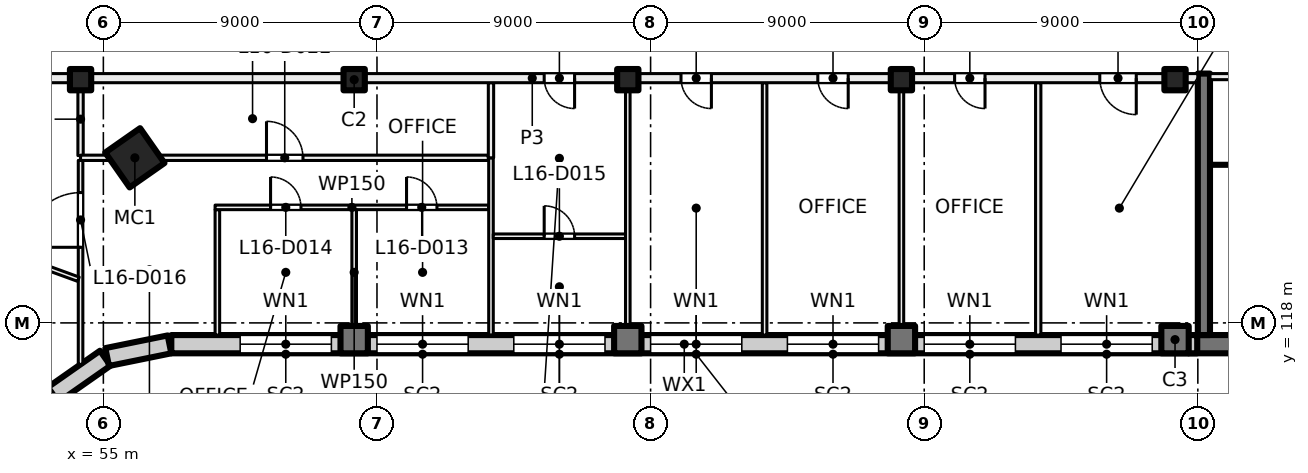
"""IFC4 building model, lengths in metres.
Left out: names, types, materials, properties, quantities, classifications, styles, units other than length and angle.
Written with IfcOpenShell. Run it as: python <this file> out.ifc"""

import sys

from ifc_helpers import new_model, si_unit, direction, frame, frame_2d, origin, origin_2d, place, context, subcontext, project, spatial, rectangle, hollow_rectangle, extrude, element, fill, save


model = new_model("IFC4")
c1 = context("Model", 3, precision=1e-05, world=origin(), true_north=direction((0.0, 1.0)))
c2 = subcontext(c1, "Body", "Model", "MODEL_VIEW")
j1 = project(units=[si_unit("LENGTHUNIT", "METRE"), si_unit("PLANEANGLEUNIT", "RADIAN")], contexts=[c1])
p1 = place(None, origin())
s1 = spatial("IfcSite", under=j1, at=p1, CompositionType="ELEMENT")
p2 = place(p1, origin())
s2 = spatial("IfcBuilding", under=s1, at=p2, CompositionType="ELEMENT")
p3 = place(p2, frame((0.0, 0.0, 71.5)))
s3 = spatial("IfcBuildingStorey", under=s2, at=p3, CompositionType="ELEMENT", Elevation=71.5)
p4 = place(p3, frame((56.036, 123.43, 0.0), z_axis=(0.0, 0.0, 1.0), x_axis=(0.573576436351, -0.819152044289, 0.0)))
e1 = element("IfcColumn", 1, at=p4, inside=s3, PredefinedType="COLUMN", context=c2, shape_type="SweptSolid", body=[
    extrude(hollow_rectangle(XDim=1.4, YDim=1.4, WallThickness=0.04, at=origin_2d()), origin(), (0.0, 0.0, 1.0), 4.0),
])
for number, where, z_axis, x_axis in (
    (2, (54.25, 126.0, 0.0), (0.0, 0.0, 1.0), (1.0, 0.0, 0.0)),
    (3, (63.25, 126.0, 0.0), (0.0, 0.0, 1.0), (1.0, 0.0, 0.0)),
    (4, (72.25, 126.0, 0.0), (0.0, 0.0, 1.0), (1.0, 0.0, 0.0)),
    (5, (81.25, 126.0, 0.0), (0.0, 0.0, 1.0), (1.0, 0.0, 0.0)),
    (6, (90.25, 126.0, 0.0), (0.0, 0.0, 1.0), (1.0, 0.0, 0.0)),
):
    element("IfcColumn", number, at=place(p3, frame(where, z_axis=z_axis, x_axis=x_axis)), inside=s3, PredefinedType="COLUMN", context=c2, shape_type="SweptSolid", body=[
        extrude(rectangle(XDim=0.7, YDim=0.7, at=origin_2d()), origin(), (0.0, 0.0, 1.0), 4.0),
    ])
for number, where, z_axis, x_axis in (
    (7, (63.25, 117.45, 0.0), (0.0, 0.0, 1.0), (1.0, 0.0, 0.0)),
    (8, (72.25, 117.45, 0.0), (0.0, 0.0, 1.0), (1.0, 0.0, 0.0)),
    (9, (81.25, 117.45, 0.0), (0.0, 0.0, 1.0), (1.0, 0.0, 0.0)),
    (10, (90.25, 117.45, 0.0), (0.0, 0.0, 1.0), (1.0, 0.0, 0.0)),
):
    element("IfcColumn", number, at=place(p3, frame(where, z_axis=z_axis, x_axis=x_axis)), inside=s3, PredefinedType="COLUMN", context=c2, shape_type="SweptSolid", body=[
        extrude(rectangle(XDim=0.9, YDim=0.9, at=origin_2d()), origin(), (0.0, 0.0, 1.0), 4.0),
    ])
p5 = place(p3, frame((99.6, 117.3, 0.0), z_axis=(0.0, 0.0, 1.0), x_axis=(-1.0, 0.0, 0.0)))
e11 = element("IfcWall", 11, at=p5, inside=s3, PredefinedType="SHEAR", context=c2, shape_type="SweptSolid", body=[
    extrude(rectangle(XDim=8.9, YDim=0.6, at=frame_2d((4.45, 0.0))), origin(), (0.0, 0.0, 1.0), 4.0),
])
p6 = place(p3, frame((91.2, 126.2, 0.0), z_axis=(0.0, 0.0, 1.0), x_axis=(0.0, -1.0, 0.0)))
e12 = element("IfcWall", 12, at=p6, inside=s3, PredefinedType="SHEAR", context=c2, shape_type="SweptSolid", body=[
    extrude(rectangle(XDim=8.6, YDim=0.4, at=frame_2d((4.3, 0.0))), origin(), (0.0, 0.0, 1.0), 4.0),
])
p7 = place(p3, frame((53.305, 115.578, 0.0), z_axis=(0.0, 0.0, 1.0), x_axis=(-0.522402266438, -0.852699168535, 0.0)))
e13 = element("IfcWall", 13, at=p7, inside=s3, PredefinedType="SOLIDWALL", context=c2, shape_type="SweptSolid", body=[
    extrude(rectangle(XDim=2.042, YDim=0.6, at=frame_2d((1.021, 0.0))), origin(), (0.0, 0.0, 1.0), 3.625),
])
for number, where, z_axis, x_axis in (
    (14, (55.062, 116.839, 0.0), (0.0, 0.0, 1.0), (-0.819, -0.574, 0.0)),
    (15, (57.175, 117.294, 0.0), (0.0, 0.0, 1.0), (-0.98, -0.199, 0.0)),
):
    element("IfcWall", number, at=place(p3, frame(where, z_axis=z_axis, x_axis=x_axis)), inside=s3, PredefinedType="SOLIDWALL", context=c2, shape_type="SweptSolid", body=[
        extrude(rectangle(XDim=2.092, YDim=0.6, at=frame_2d((1.046, 0.0))), origin(), (0.0, 0.0, 1.0), 3.625),
    ])
p8 = place(p3, frame((90.98, 117.3, 0.0), z_axis=(0.0, 0.0, 1.0), x_axis=(-1.0, 0.0, 0.0)))
e16 = element("IfcWall", 16, at=p8, inside=s3, PredefinedType="SOLIDWALL", context=c2, shape_type="SweptSolid", body=[
    extrude(rectangle(XDim=33.745, YDim=0.6, at=frame_2d((16.873, 0.0))), origin(), (0.0, 0.0, 1.0), 3.625),
])
p9 = place(p8, frame((1.48, 0.0, 0.9)))
e17 = element("IfcOpeningElement", 17, at=p9, cuts=e16, PredefinedType="OPENING", context=c2, shape_type="SweptSolid", body=[
    extrude(rectangle(XDim=3.0, YDim=2.4, at=frame_2d((1.5, 1.2))), frame((0.0, 0.31, 0.0), z_axis=(0.0, -1.0, 0.0), x_axis=(1.0, 0.0, 0.0)), (0.0, 0.0, 1.0), 0.62),
])
p10 = place(p8, frame((5.98, 0.0, 0.9)))
e18 = element("IfcOpeningElement", 18, at=p10, cuts=e16, PredefinedType="OPENING", context=c2, shape_type="SweptSolid", body=[
    extrude(rectangle(XDim=3.0, YDim=2.4, at=frame_2d((1.5, 1.2))), frame((0.0, 0.31, 0.0), z_axis=(0.0, -1.0, 0.0), x_axis=(1.0, 0.0, 0.0)), (0.0, 0.0, 1.0), 0.62),
])
p11 = place(p8, frame((10.48, 0.0, 0.9)))
e19 = element("IfcOpeningElement", 19, at=p11, cuts=e16, PredefinedType="OPENING", context=c2, shape_type="SweptSolid", body=[
    extrude(rectangle(XDim=3.0, YDim=2.4, at=frame_2d((1.5, 1.2))), frame((0.0, 0.31, 0.0), z_axis=(0.0, -1.0, 0.0), x_axis=(1.0, 0.0, 0.0)), (0.0, 0.0, 1.0), 0.62),
])
p12 = place(p8, frame((14.98, 0.0, 0.9)))
e20 = element("IfcOpeningElement", 20, at=p12, cuts=e16, PredefinedType="OPENING", context=c2, shape_type="SweptSolid", body=[
    extrude(rectangle(XDim=3.0, YDim=2.4, at=frame_2d((1.5, 1.2))), frame((0.0, 0.31, 0.0), z_axis=(0.0, -1.0, 0.0), x_axis=(1.0, 0.0, 0.0)), (0.0, 0.0, 1.0), 0.62),
])
p13 = place(p8, frame((19.48, 0.0, 0.9)))
e21 = element("IfcOpeningElement", 21, at=p13, cuts=e16, PredefinedType="OPENING", context=c2, shape_type="SweptSolid", body=[
    extrude(rectangle(XDim=3.0, YDim=2.4, at=frame_2d((1.5, 1.2))), frame((0.0, 0.31, 0.0), z_axis=(0.0, -1.0, 0.0), x_axis=(1.0, 0.0, 0.0)), (0.0, 0.0, 1.0), 0.62),
])
p14 = place(p8, frame((23.98, 0.0, 0.9)))
e22 = element("IfcOpeningElement", 22, at=p14, cuts=e16, PredefinedType="OPENING", context=c2, shape_type="SweptSolid", body=[
    extrude(rectangle(XDim=3.0, YDim=2.4, at=frame_2d((1.5, 1.2))), frame((0.0, 0.31, 0.0), z_axis=(0.0, -1.0, 0.0), x_axis=(1.0, 0.0, 0.0)), (0.0, 0.0, 1.0), 0.62),
])
p15 = place(p8, frame((28.48, 0.0, 0.9)))
e23 = element("IfcOpeningElement", 23, at=p15, cuts=e16, PredefinedType="OPENING", context=c2, shape_type="SweptSolid", body=[
    extrude(rectangle(XDim=3.0, YDim=2.4, at=frame_2d((1.5, 1.2))), frame((0.0, 0.31, 0.0), z_axis=(0.0, -1.0, 0.0), x_axis=(1.0, 0.0, 0.0)), (0.0, 0.0, 1.0), 0.62),
])
p16 = place(p3, frame((95.2, 126.1, 0.0), z_axis=(0.0, 0.0, 1.0), x_axis=(-1.0, 0.0, 0.0)))
e24 = element("IfcWall", 24, at=p16, inside=s3, PredefinedType="PARTITIONING", context=c2, shape_type="SweptSolid", body=[
    extrude(rectangle(XDim=3.8, YDim=0.2, at=frame_2d((1.9, 0.0))), origin(), (0.0, 0.0, 1.0), 3.625),
])
p17 = place(p16, frame((0.3, 0.0, 0.0)))
e25 = element("IfcOpeningElement", 25, at=p17, cuts=e24, PredefinedType="OPENING", context=c2, shape_type="SweptSolid", body=[
    extrude(rectangle(XDim=1.2, YDim=2.1, at=frame_2d((0.6, 1.05))), frame((0.0, 0.11, 0.0), z_axis=(0.0, -1.0, 0.0), x_axis=(1.0, 0.0, 0.0)), (0.0, 0.0, 1.0), 0.22),
])
p18 = place(p3, frame((93.35, 123.2, 0.0), z_axis=(0.0, 0.0, 1.0), x_axis=(-1.0, 0.0, 0.0)))
e26 = element("IfcWall", 26, at=p18, inside=s3, PredefinedType="PARTITIONING", context=c2, shape_type="SweptSolid", body=[
    extrude(rectangle(XDim=1.95, YDim=0.1, at=frame_2d((0.975, 0.0))), origin(), (0.0, 0.0, 1.0), 3.625),
])
p19 = place(p3, frame((54.25, 116.637, 0.0), z_axis=(0.0, 0.0, 1.0), x_axis=(0.0, 1.0, 0.0)))
e27 = element("IfcWall", 27, at=p19, inside=s3, PredefinedType="PARTITIONING", context=c2, shape_type="SweptSolid", body=[
    extrude(rectangle(XDim=6.709, YDim=0.15, at=frame_2d((3.354, 0.0))), origin(), (0.0, 0.0, 1.0), 3.625),
])
p20 = place(p19, frame((3.85, 0.0, 0.0)))
e28 = element("IfcOpeningElement", 28, at=p20, cuts=e27, PredefinedType="OPENING", context=c2, shape_type="SweptSolid", body=[
    extrude(rectangle(XDim=1.8, YDim=2.1, at=frame_2d((0.9, 1.05))), frame((0.0, 0.085, 0.0), z_axis=(0.0, -1.0, 0.0), x_axis=(1.0, 0.0, 0.0)), (0.0, 0.0, 1.0), 0.17),
])
p21 = place(p3, frame((54.18, 119.436, 0.0), z_axis=(0.0, 0.0, 1.0), x_axis=(-0.939669476286, 0.342083725624, 0.0)))
e29 = element("IfcWall", 29, at=p21, inside=s3, PredefinedType="PARTITIONING", context=c2, shape_type="SweptSolid", body=[
    extrude(rectangle(XDim=8.516, YDim=0.15, at=frame_2d((4.258, 0.0))), origin(), (0.0, 0.0, 1.0), 3.625),
])
p22 = place(p3, frame((54.25, 123.502, 0.0), z_axis=(0.0, 0.0, 1.0), x_axis=(0.0, 1.0, 0.0)))
e30 = element("IfcWall", 30, at=p22, inside=s3, PredefinedType="PARTITIONING", context=c2, shape_type="SweptSolid", body=[
    extrude(rectangle(XDim=2.398, YDim=0.175, at=frame_2d((1.199, 0.0))), origin(), (0.0, 0.0, 1.0), 3.625),
])
p23 = place(p3, frame((54.25, 123.43, 0.0), z_axis=(0.0, 0.0, 1.0), x_axis=(1.0, 0.0, 0.0)))
e31 = element("IfcWall", 31, at=p23, inside=s3, PredefinedType="PARTITIONING", context=c2, shape_type="SweptSolid", body=[
    extrude(rectangle(XDim=13.412, YDim=0.175, at=frame_2d((6.706, 0.0))), origin(), (0.0, 0.0, 1.0), 3.625),
])
p24 = place(p23, frame((6.116, 0.0, 0.0)))
e32 = element("IfcOpeningElement", 32, at=p24, cuts=e31, PredefinedType="OPENING", context=c2, shape_type="SweptSolid", body=[
    extrude(rectangle(XDim=1.2, YDim=2.1, at=frame_2d((0.6, 1.05))), frame((0.0, 0.097, 0.0), z_axis=(0.0, -1.0, 0.0), x_axis=(1.0, 0.0, 0.0)), (0.0, 0.0, 1.0), 0.195),
])
p25 = place(p3, frame((58.75, 117.6, 0.0), z_axis=(0.0, 0.0, 1.0), x_axis=(0.0, 1.0, 0.0)))
e33 = element("IfcWall", 33, at=p25, inside=s3, PredefinedType="PARTITIONING", context=c2, shape_type="SweptSolid", body=[
    extrude(rectangle(XDim=4.125, YDim=0.15, at=frame_2d((2.062, 0.0))), origin(), (0.0, 0.0, 1.0), 3.625),
])
p26 = place(p3, frame((58.675, 121.8, 0.0), z_axis=(0.0, 0.0, 1.0), x_axis=(1.0, 0.0, 0.0)))
e34 = element("IfcWall", 34, at=p26, inside=s3, PredefinedType="PARTITIONING", context=c2, shape_type="SweptSolid", body=[
    extrude(rectangle(XDim=9.0, YDim=0.15, at=frame_2d((4.5, 0.0))), origin(), (0.0, 0.0, 1.0), 3.625),
])
p27 = place(p26, frame((6.298, 0.0, 0.0)))
e35 = element("IfcOpeningElement", 35, at=p27, cuts=e34, PredefinedType="OPENING", context=c2, shape_type="SweptSolid", body=[
    extrude(rectangle(XDim=1.0, YDim=2.1, at=frame_2d((0.5, 1.05))), frame((0.0, 0.085, 0.0), z_axis=(0.0, -1.0, 0.0), x_axis=(1.0, 0.0, 0.0)), (0.0, 0.0, 1.0), 0.17),
])
p28 = place(p26, frame((1.825, 0.0, 0.0)))
e36 = element("IfcOpeningElement", 36, at=p28, cuts=e34, PredefinedType="OPENING", context=c2, shape_type="SweptSolid", body=[
    extrude(rectangle(XDim=1.0, YDim=2.1, at=frame_2d((0.5, 1.05))), frame((0.0, 0.085, 0.0), z_axis=(0.0, -1.0, 0.0), x_axis=(1.0, 0.0, 0.0)), (0.0, 0.0, 1.0), 0.17),
])
p29 = place(p3, frame((63.25, 117.6, 0.0), z_axis=(0.0, 0.0, 1.0), x_axis=(0.0, 1.0, 0.0)))
e37 = element("IfcWall", 37, at=p29, inside=s3, PredefinedType="PARTITIONING", context=c2, shape_type="SweptSolid", body=[
    extrude(rectangle(XDim=4.125, YDim=0.15, at=frame_2d((2.062, 0.0))), origin(), (0.0, 0.0, 1.0), 3.625),
])
p30 = place(p3, frame((67.75, 117.6, 0.0), z_axis=(0.0, 0.0, 1.0), x_axis=(0.0, 1.0, 0.0)))
e38 = element("IfcWall", 38, at=p30, inside=s3, PredefinedType="PARTITIONING", context=c2, shape_type="SweptSolid", body=[
    extrude(rectangle(XDim=5.83, YDim=0.15, at=frame_2d((2.915, 0.0))), origin(), (0.0, 0.0, 1.0), 3.625),
])
p31 = place(p3, frame((67.825, 120.85, 0.0), z_axis=(0.0, 0.0, 1.0), x_axis=(1.0, 0.0, 0.0)))
e39 = element("IfcWall", 39, at=p31, inside=s3, PredefinedType="PARTITIONING", context=c2, shape_type="SweptSolid", body=[
    extrude(rectangle(XDim=4.35, YDim=0.15, at=frame_2d((2.175, 0.0))), origin(), (0.0, 0.0, 1.0), 3.625),
])
p32 = place(p31, frame((1.675, 0.0, 0.0)))
e40 = element("IfcOpeningElement", 40, at=p32, cuts=e39, PredefinedType="OPENING", context=c2, shape_type="SweptSolid", body=[
    extrude(rectangle(XDim=1.0, YDim=2.1, at=frame_2d((0.5, 1.05))), frame((0.0, 0.085, 0.0), z_axis=(0.0, -1.0, 0.0), x_axis=(1.0, 0.0, 0.0)), (0.0, 0.0, 1.0), 0.17),
])
p33 = place(p3, frame((67.75, 123.43, 0.0), z_axis=(0.0, 0.0, 1.0), x_axis=(0.0, 1.0, 0.0)))
e41 = element("IfcWall", 41, at=p33, inside=s3, PredefinedType="PARTITIONING", context=c2, shape_type="SweptSolid", body=[
    extrude(rectangle(XDim=2.47, YDim=0.175, at=frame_2d((1.235, 0.0))), origin(), (0.0, 0.0, 1.0), 3.625),
])
for number, where, z_axis, x_axis in (
    (42, (72.25, 117.6, 0.0), (0.0, 0.0, 1.0), (0.0, 1.0, 0.0)),
    (43, (76.75, 117.6, 0.0), (0.0, 0.0, 1.0), (0.0, 1.0, 0.0)),
    (44, (81.25, 117.6, 0.0), (0.0, 0.0, 1.0), (0.0, 1.0, 0.0)),
):
    element("IfcWall", number, at=place(p3, frame(where, z_axis=z_axis, x_axis=x_axis)), inside=s3, PredefinedType="PARTITIONING", context=c2, shape_type="SweptSolid", body=[
        extrude(rectangle(XDim=8.3, YDim=0.15, at=frame_2d((4.15, 0.0))), origin(), (0.0, 0.0, 1.0), 3.625),
    ])
p34 = place(p3, frame((85.75, 117.6, 0.0), z_axis=(0.0, 0.0, 1.0), x_axis=(0.0, 1.0, 0.0)))
e45 = element("IfcWall", 45, at=p34, inside=s3, PredefinedType="PARTITIONING", context=c2, shape_type="SweptSolid", body=[
    extrude(rectangle(XDim=8.3, YDim=0.175, at=frame_2d((4.15, 0.0))), origin(), (0.0, 0.0, 1.0), 3.625),
])
p35 = place(p3, frame((91.0, 126.05, 0.0), z_axis=(0.0, 0.0, 1.0), x_axis=(-1.0, 0.0, 0.0)))
e46 = element("IfcWall", 46, at=p35, inside=s3, PredefinedType="PARTITIONING", context=c2, shape_type="SweptSolid", body=[
    extrude(rectangle(XDim=43.785, YDim=0.3, at=frame_2d((21.893, 0.0))), origin(), (0.0, 0.0, 1.0), 3.625),
])
p36 = place(p35, frame((2.025, 0.0, 0.0)))
e47 = element("IfcOpeningElement", 47, at=p36, cuts=e46, PredefinedType="OPENING", context=c2, shape_type="SweptSolid", body=[
    extrude(rectangle(XDim=1.2, YDim=2.1, at=frame_2d((0.6, 1.05))), frame((0.0, 0.16, 0.0), z_axis=(0.0, -1.0, 0.0), x_axis=(1.0, 0.0, 0.0)), (0.0, 0.0, 1.0), 0.32),
])
p37 = place(p35, frame((7.0, 0.0, 0.0)))
e48 = element("IfcOpeningElement", 48, at=p37, cuts=e46, PredefinedType="OPENING", context=c2, shape_type="SweptSolid", body=[
    extrude(rectangle(XDim=1.0, YDim=2.1, at=frame_2d((0.5, 1.05))), frame((0.0, 0.16, 0.0), z_axis=(0.0, -1.0, 0.0), x_axis=(1.0, 0.0, 0.0)), (0.0, 0.0, 1.0), 0.32),
])
p38 = place(p35, frame((11.5, 0.0, 0.0)))
e49 = element("IfcOpeningElement", 49, at=p38, cuts=e46, PredefinedType="OPENING", context=c2, shape_type="SweptSolid", body=[
    extrude(rectangle(XDim=1.0, YDim=2.1, at=frame_2d((0.5, 1.05))), frame((0.0, 0.16, 0.0), z_axis=(0.0, -1.0, 0.0), x_axis=(1.0, 0.0, 0.0)), (0.0, 0.0, 1.0), 0.32),
])
p39 = place(p35, frame((16.0, 0.0, 0.0)))
e50 = element("IfcOpeningElement", 50, at=p39, cuts=e46, PredefinedType="OPENING", context=c2, shape_type="SweptSolid", body=[
    extrude(rectangle(XDim=1.0, YDim=2.1, at=frame_2d((0.5, 1.05))), frame((0.0, 0.16, 0.0), z_axis=(0.0, -1.0, 0.0), x_axis=(1.0, 0.0, 0.0)), (0.0, 0.0, 1.0), 0.32),
])
p40 = place(p35, frame((20.5, 0.0, 0.0)))
e51 = element("IfcOpeningElement", 51, at=p40, cuts=e46, PredefinedType="OPENING", context=c2, shape_type="SweptSolid", body=[
    extrude(rectangle(XDim=1.0, YDim=2.1, at=frame_2d((0.5, 1.05))), frame((0.0, 0.16, 0.0), z_axis=(0.0, -1.0, 0.0), x_axis=(1.0, 0.0, 0.0)), (0.0, 0.0, 1.0), 0.32),
])
p41 = place(p35, frame((39.296, 0.0, 0.0)))
e52 = element("IfcOpeningElement", 52, at=p41, cuts=e46, PredefinedType="OPENING", context=c2, shape_type="SweptSolid", body=[
    extrude(rectangle(XDim=1.8, YDim=2.1, at=frame_2d((0.9, 1.05))), frame((0.0, 0.16, 0.0), z_axis=(0.0, -1.0, 0.0), x_axis=(1.0, 0.0, 0.0)), (0.0, 0.0, 1.0), 0.32),
])
p42 = place(p9, origin())
e53 = element("IfcWindow", 53, at=p42, inside=s3, PartitioningType="SINGLE_PANEL", PredefinedType="WINDOW", context=c2, shape_type="SweptSolid", body=[
    extrude(rectangle(XDim=3.0, YDim=2.4, at=frame_2d((1.5, 1.2))), frame((0.0, 0.03, 0.0), z_axis=(0.0, -1.0, 0.0), x_axis=(1.0, 0.0, 0.0)), (0.0, 0.0, 1.0), 0.06),
])
fill(e17, e53)
p43 = place(p10, origin())
e54 = element("IfcWindow", 54, at=p43, inside=s3, PartitioningType="SINGLE_PANEL", PredefinedType="WINDOW", context=c2, shape_type="SweptSolid", body=[
    extrude(rectangle(XDim=3.0, YDim=2.4, at=frame_2d((1.5, 1.2))), frame((0.0, 0.03, 0.0), z_axis=(0.0, -1.0, 0.0), x_axis=(1.0, 0.0, 0.0)), (0.0, 0.0, 1.0), 0.06),
])
fill(e18, e54)
p44 = place(p11, origin())
e55 = element("IfcWindow", 55, at=p44, inside=s3, PartitioningType="SINGLE_PANEL", PredefinedType="WINDOW", context=c2, shape_type="SweptSolid", body=[
    extrude(rectangle(XDim=3.0, YDim=2.4, at=frame_2d((1.5, 1.2))), frame((0.0, 0.03, 0.0), z_axis=(0.0, -1.0, 0.0), x_axis=(1.0, 0.0, 0.0)), (0.0, 0.0, 1.0), 0.06),
])
fill(e19, e55)
p45 = place(p12, origin())
e56 = element("IfcWindow", 56, at=p45, inside=s3, PartitioningType="SINGLE_PANEL", PredefinedType="WINDOW", context=c2, shape_type="SweptSolid", body=[
    extrude(rectangle(XDim=3.0, YDim=2.4, at=frame_2d((1.5, 1.2))), frame((0.0, 0.03, 0.0), z_axis=(0.0, -1.0, 0.0), x_axis=(1.0, 0.0, 0.0)), (0.0, 0.0, 1.0), 0.06),
])
fill(e20, e56)
p46 = place(p13, origin())
e57 = element("IfcWindow", 57, at=p46, inside=s3, PartitioningType="SINGLE_PANEL", PredefinedType="WINDOW", context=c2, shape_type="SweptSolid", body=[
    extrude(rectangle(XDim=3.0, YDim=2.4, at=frame_2d((1.5, 1.2))), frame((0.0, 0.03, 0.0), z_axis=(0.0, -1.0, 0.0), x_axis=(1.0, 0.0, 0.0)), (0.0, 0.0, 1.0), 0.06),
])
fill(e21, e57)
p47 = place(p14, origin())
e58 = element("IfcWindow", 58, at=p47, inside=s3, PartitioningType="SINGLE_PANEL", PredefinedType="WINDOW", context=c2, shape_type="SweptSolid", body=[
    extrude(rectangle(XDim=3.0, YDim=2.4, at=frame_2d((1.5, 1.2))), frame((0.0, 0.03, 0.0), z_axis=(0.0, -1.0, 0.0), x_axis=(1.0, 0.0, 0.0)), (0.0, 0.0, 1.0), 0.06),
])
fill(e22, e58)
p48 = place(p15, origin())
e59 = element("IfcWindow", 59, at=p48, inside=s3, PartitioningType="SINGLE_PANEL", PredefinedType="WINDOW", context=c2, shape_type="SweptSolid", body=[
    extrude(rectangle(XDim=3.0, YDim=2.4, at=frame_2d((1.5, 1.2))), frame((0.0, 0.03, 0.0), z_axis=(0.0, -1.0, 0.0), x_axis=(1.0, 0.0, 0.0)), (0.0, 0.0, 1.0), 0.06),
])
fill(e23, e59)
p49 = place(p36, origin())
e60 = element("IfcDoor", 60, at=p49, inside=s3, OperationType="DOUBLE_DOOR_SINGLE_SWING", PredefinedType="DOOR", context=c2, shape_type="SweptSolid", body=[
    extrude(rectangle(XDim=1.2, YDim=2.1, at=frame_2d((0.6, 1.05))), frame((0.0, 0.025, 0.0), z_axis=(0.0, -1.0, 0.0), x_axis=(1.0, 0.0, 0.0)), (0.0, 0.0, 1.0), 0.05),
])
fill(e47, e60)
p50 = place(p37, origin())
e61 = element("IfcDoor", 61, at=p50, inside=s3, OperationType="SINGLE_SWING_RIGHT", PredefinedType="DOOR", context=c2, shape_type="SweptSolid", body=[
    extrude(rectangle(XDim=1.0, YDim=2.1, at=frame_2d((0.5, 1.05))), frame((0.0, 0.025, 0.0), z_axis=(0.0, -1.0, 0.0), x_axis=(1.0, 0.0, 0.0)), (0.0, 0.0, 1.0), 0.05),
])
fill(e48, e61)
p51 = place(p38, origin())
e62 = element("IfcDoor", 62, at=p51, inside=s3, OperationType="SINGLE_SWING_LEFT", PredefinedType="DOOR", context=c2, shape_type="SweptSolid", body=[
    extrude(rectangle(XDim=1.0, YDim=2.1, at=frame_2d((0.5, 1.05))), frame((0.0, 0.025, 0.0), z_axis=(0.0, -1.0, 0.0), x_axis=(1.0, 0.0, 0.0)), (0.0, 0.0, 1.0), 0.05),
])
fill(e49, e62)
p52 = place(p39, origin())
e63 = element("IfcDoor", 63, at=p52, inside=s3, OperationType="SINGLE_SWING_LEFT", PredefinedType="DOOR", context=c2, shape_type="SweptSolid", body=[
    extrude(rectangle(XDim=1.0, YDim=2.1, at=frame_2d((0.5, 1.05))), frame((0.0, 0.025, 0.0), z_axis=(0.0, -1.0, 0.0), x_axis=(1.0, 0.0, 0.0)), (0.0, 0.0, 1.0), 0.05),
])
fill(e50, e63)
p53 = place(p40, origin())
e64 = element("IfcDoor", 64, at=p53, inside=s3, OperationType="SINGLE_SWING_LEFT", PredefinedType="DOOR", context=c2, shape_type="SweptSolid", body=[
    extrude(rectangle(XDim=1.0, YDim=2.1, at=frame_2d((0.5, 1.05))), frame((0.0, 0.025, 0.0), z_axis=(0.0, -1.0, 0.0), x_axis=(1.0, 0.0, 0.0)), (0.0, 0.0, 1.0), 0.05),
])
fill(e51, e64)
p54 = place(p27, origin())
e65 = element("IfcDoor", 65, at=p54, inside=s3, OperationType="SINGLE_SWING_RIGHT", PredefinedType="DOOR", context=c2, shape_type="SweptSolid", body=[
    extrude(rectangle(XDim=1.0, YDim=2.1, at=frame_2d((0.5, 1.05))), frame((0.0, 0.025, 0.0), z_axis=(0.0, -1.0, 0.0), x_axis=(1.0, 0.0, 0.0)), (0.0, 0.0, 1.0), 0.05),
])
fill(e35, e65)
p55 = place(p28, origin())
e66 = element("IfcDoor", 66, at=p55, inside=s3, OperationType="SINGLE_SWING_LEFT", PredefinedType="DOOR", context=c2, shape_type="SweptSolid", body=[
    extrude(rectangle(XDim=1.0, YDim=2.1, at=frame_2d((0.5, 1.05))), frame((0.0, 0.025, 0.0), z_axis=(0.0, -1.0, 0.0), x_axis=(1.0, 0.0, 0.0)), (0.0, 0.0, 1.0), 0.05),
])
fill(e36, e66)
p56 = place(p32, origin())
e67 = element("IfcDoor", 67, at=p56, inside=s3, OperationType="SINGLE_SWING_LEFT", PredefinedType="DOOR", context=c2, shape_type="SweptSolid", body=[
    extrude(rectangle(XDim=1.0, YDim=2.1, at=frame_2d((0.5, 1.05))), frame((0.0, 0.025, 0.0), z_axis=(0.0, -1.0, 0.0), x_axis=(1.0, 0.0, 0.0)), (0.0, 0.0, 1.0), 0.05),
])
fill(e40, e67)
p57 = place(p20, origin())
e68 = element("IfcDoor", 68, at=p57, inside=s3, OperationType="DOUBLE_DOOR_SINGLE_SWING", PredefinedType="DOOR", context=c2, shape_type="SweptSolid", body=[
    extrude(rectangle(XDim=1.8, YDim=2.1, at=frame_2d((0.9, 1.05))), frame((0.0, 0.025, 0.0), z_axis=(0.0, -1.0, 0.0), x_axis=(1.0, 0.0, 0.0)), (0.0, 0.0, 1.0), 0.05),
])
fill(e28, e68)
p58 = place(p24, origin())
e69 = element("IfcDoor", 69, at=p58, inside=s3, OperationType="DOUBLE_DOOR_SINGLE_SWING", PredefinedType="DOOR", context=c2, shape_type="SweptSolid", body=[
    extrude(rectangle(XDim=1.2, YDim=2.1, at=frame_2d((0.6, 1.05))), frame((0.0, 0.025, 0.0), z_axis=(0.0, -1.0, 0.0), x_axis=(1.0, 0.0, 0.0)), (0.0, 0.0, 1.0), 0.05),
])
fill(e32, e69)
save(model, sys.argv[1])
